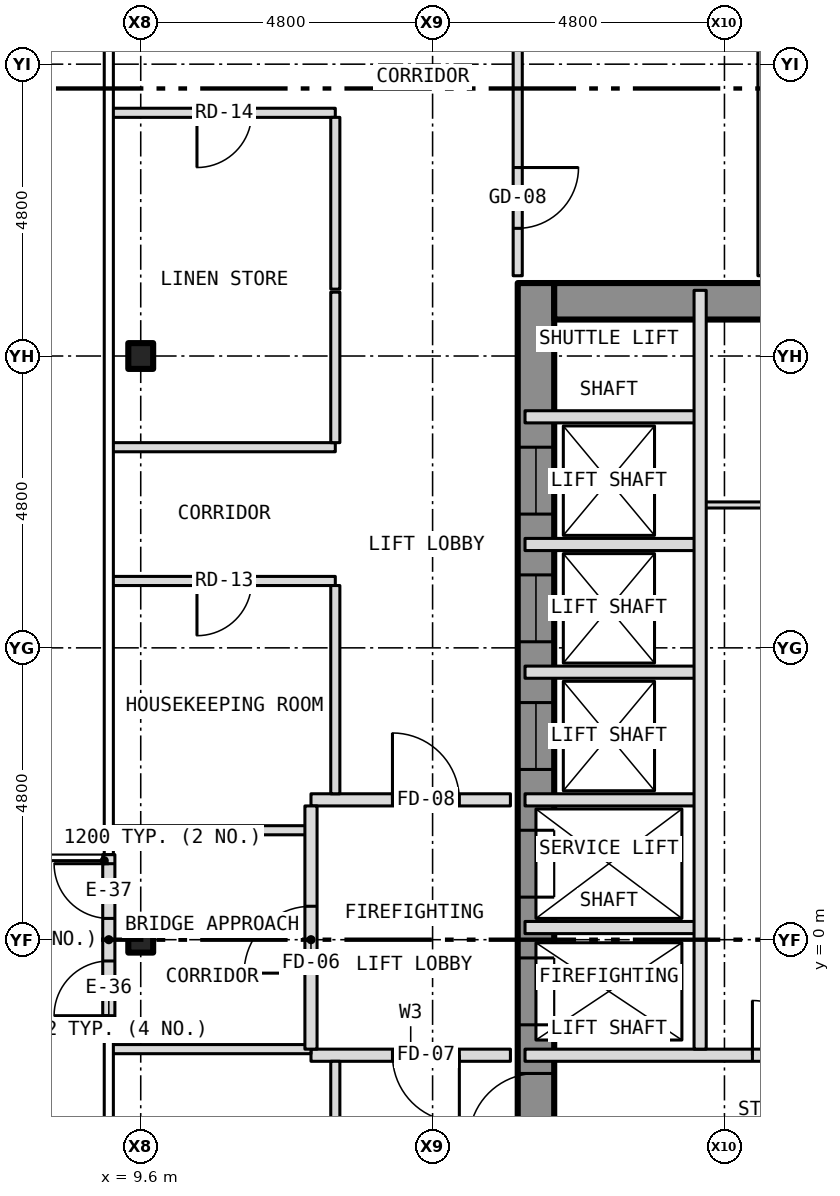
"""IFC4 building model, lengths in metres.
Left out: names, types, materials, properties, quantities, classifications, styles, units other than length and angle.
Written with IfcOpenShell. Run it as: python <this file> out.ifc"""

import sys

from ifc_helpers import new_model, si_unit, direction, frame, frame_2d, origin, origin_2d, place, context, subcontext, project, spatial, rectangle, i_section, extrude, element, fill, save


model = new_model("IFC4")
c1 = context("Model", 3, precision=1e-05, world=origin(), true_north=direction((0.0, 1.0)))
c2 = subcontext(c1, "Body", "Model", "MODEL_VIEW")
j1 = project(units=[si_unit("LENGTHUNIT", "METRE"), si_unit("PLANEANGLEUNIT", "RADIAN")], contexts=[c1])
p1 = place(None, origin())
s1 = spatial("IfcSite", under=j1, at=p1, CompositionType="ELEMENT")
p2 = place(p1, origin())
s2 = spatial("IfcBuilding", under=s1, at=p2, CompositionType="ELEMENT")
p3 = place(p2, frame((0.0, 0.0, 77.5)))
s3 = spatial("IfcBuildingStorey", under=s2, at=p3, CompositionType="ELEMENT", Elevation=77.5)
for number, where, z_axis, x_axis in (
    (1, (9.6, 0.0, -0.15), (0.0, 0.0, 1.0), (1.0, 0.0, 0.0)),
    (2, (9.6, 9.6, -0.15), (0.0, 0.0, 1.0), (1.0, 0.0, 0.0)),
):
    element("IfcColumn", number, at=place(p3, frame(where, z_axis=z_axis, x_axis=x_axis)), inside=s3, PredefinedType="COLUMN", context=c2, shape_type="SweptSolid", body=[
        extrude(i_section(OverallWidth=0.409, OverallDepth=0.424, WebThickness=0.033, FlangeThickness=0.052, at=origin_2d()), origin(), (0.0, 0.0, 1.0), 3.5),
    ])
p4 = place(p3, frame((16.1, -10.8, 0.0), z_axis=(0.0, 0.0, 1.0), x_axis=(0.0, 1.0, 0.0)))
e3 = element("IfcWall", 3, at=p4, inside=s3, PredefinedType="SHEAR", context=c2, shape_type="SweptSolid", body=[
    extrude(rectangle(XDim=21.6, YDim=0.6, at=frame_2d((10.8, 0.0))), origin(), (0.0, 0.0, 1.0), 3.25),
])
p5 = place(p4, frame((9.4, 0.0, 0.0)))
e4 = element("IfcOpeningElement", 4, at=p5, cuts=e3, PredefinedType="OPENING", context=c2, shape_type="SweptSolid", body=[
    extrude(rectangle(XDim=1.1, YDim=2.1, at=frame_2d((0.55, 1.05))), frame((0.0, 0.312, 0.0), z_axis=(0.0, -1.0, 0.0), x_axis=(1.0, 0.0, 0.0)), (0.0, 0.0, 1.0), 0.624),
])
p6 = place(p4, frame((11.5, 0.0, 0.0)))
e5 = element("IfcOpeningElement", 5, at=p6, cuts=e3, PredefinedType="OPENING", context=c2, shape_type="SweptSolid", body=[
    extrude(rectangle(XDim=1.1, YDim=2.1, at=frame_2d((0.55, 1.05))), frame((0.0, 0.312, 0.0), z_axis=(0.0, -1.0, 0.0), x_axis=(1.0, 0.0, 0.0)), (0.0, 0.0, 1.0), 0.624),
])
p7 = place(p4, frame((13.6, 0.0, 0.0)))
e6 = element("IfcOpeningElement", 6, at=p7, cuts=e3, PredefinedType="OPENING", context=c2, shape_type="SweptSolid", body=[
    extrude(rectangle(XDim=1.1, YDim=2.1, at=frame_2d((0.55, 1.05))), frame((0.0, 0.312, 0.0), z_axis=(0.0, -1.0, 0.0), x_axis=(1.0, 0.0, 0.0)), (0.0, 0.0, 1.0), 0.624),
])
p8 = place(p4, frame((15.7, 0.0, 0.0)))
e7 = element("IfcOpeningElement", 7, at=p8, cuts=e3, PredefinedType="OPENING", context=c2, shape_type="SweptSolid", body=[
    extrude(rectangle(XDim=1.1, YDim=2.1, at=frame_2d((0.55, 1.05))), frame((0.0, 0.312, 0.0), z_axis=(0.0, -1.0, 0.0), x_axis=(1.0, 0.0, 0.0)), (0.0, 0.0, 1.0), 0.624),
])
p9 = place(p4, frame((17.8, 0.0, 0.0)))
e8 = element("IfcOpeningElement", 8, at=p9, cuts=e3, PredefinedType="OPENING", context=c2, shape_type="SweptSolid", body=[
    extrude(rectangle(XDim=1.1, YDim=2.1, at=frame_2d((0.55, 1.05))), frame((0.0, 0.312, 0.0), z_axis=(0.0, -1.0, 0.0), x_axis=(1.0, 0.0, 0.0)), (0.0, 0.0, 1.0), 0.624),
])
p10 = place(p4, frame((5.642, 0.0, 0.0)))
e9 = element("IfcOpeningElement", 9, at=p10, cuts=e3, PredefinedType="OPENING", context=c2, shape_type="SweptSolid", body=[
    extrude(rectangle(XDim=1.1, YDim=2.1, at=frame_2d((0.55, 1.05))), frame((0.0, 0.312, 0.0), z_axis=(0.0, -1.0, 0.0), x_axis=(1.0, 0.0, 0.0)), (0.0, 0.0, 1.0), 0.624),
])
p11 = place(p4, frame((7.5, 0.0, 0.0)))
e10 = element("IfcOpeningElement", 10, at=p11, cuts=e3, PredefinedType="OPENING", context=c2, shape_type="SweptSolid", body=[
    extrude(rectangle(XDim=1.1, YDim=2.1, at=frame_2d((0.55, 1.05))), frame((0.0, 0.312, 0.0), z_axis=(0.0, -1.0, 0.0), x_axis=(1.0, 0.0, 0.0)), (0.0, 0.0, 1.0), 0.624),
])
p12 = place(p3, frame((16.4, 10.5, 0.0), z_axis=(0.0, 0.0, 1.0), x_axis=(1.0, 0.0, 0.0)))
e11 = element("IfcWall", 11, at=p12, inside=s3, PredefinedType="SHEAR", context=c2, shape_type="SweptSolid", body=[
    extrude(rectangle(XDim=7.0, YDim=0.6, at=frame_2d((3.5, 0.0))), origin(), (0.0, 0.0, 1.0), 3.25),
])
p13 = place(p3, frame((9.075, -1.4, 0.0), z_axis=(0.0, 0.0, 1.0), x_axis=(0.0, 1.0, 0.0)))
e12 = element("IfcWall", 12, at=p13, inside=s3, PredefinedType="SOLIDWALL", context=c2, shape_type="SweptSolid", body=[
    extrude(rectangle(XDim=2.8, YDim=0.2, at=frame_2d((1.4, 0.0))), origin(), (0.0, 0.0, 1.0), 3.5),
])
p14 = place(p13, frame((0.15, 0.0, 0.0)))
e13 = element("IfcOpeningElement", 13, at=p14, cuts=e12, PredefinedType="OPENING", context=c2, shape_type="SweptSolid", body=[
    extrude(rectangle(XDim=0.9, YDim=2.1, at=frame_2d((0.45, 1.05))), frame((0.0, 0.112, 0.0), z_axis=(0.0, -1.0, 0.0), x_axis=(1.0, 0.0, 0.0)), (0.0, 0.0, 1.0), 0.224),
])
p15 = place(p13, frame((1.75, 0.0, 0.0)))
e14 = element("IfcOpeningElement", 14, at=p15, cuts=e12, PredefinedType="OPENING", context=c2, shape_type="SweptSolid", body=[
    extrude(rectangle(XDim=0.9, YDim=2.1, at=frame_2d((0.45, 1.05))), frame((0.0, 0.112, 0.0), z_axis=(0.0, -1.0, 0.0), x_axis=(1.0, 0.0, 0.0)), (0.0, 0.0, 1.0), 0.224),
])
p16 = place(p3, frame((12.4, -1.9, 0.0), z_axis=(0.0, 0.0, 1.0), x_axis=(1.0, 0.0, 0.0)))
e15 = element("IfcWall", 15, at=p16, inside=s3, PredefinedType="PARTITIONING", context=c2, shape_type="SweptSolid", body=[
    extrude(rectangle(XDim=3.28, YDim=0.2, at=frame_2d((1.64, 0.0))), origin(), (0.0, 0.0, 1.0), 3.35),
])
p17 = place(p16, frame((1.34, 0.0, 0.0)))
e16 = element("IfcOpeningElement", 16, at=p17, cuts=e15, PredefinedType="OPENING", context=c2, shape_type="SweptSolid", body=[
    extrude(rectangle(XDim=1.1, YDim=2.1, at=frame_2d((0.55, 1.05))), frame((0.0, 0.112, 0.0), z_axis=(0.0, -1.0, 0.0), x_axis=(1.0, 0.0, 0.0)), (0.0, 0.0, 1.0), 0.224),
])
p18 = place(p3, frame((15.92, -1.9, 0.0), z_axis=(0.0, 0.0, 1.0), x_axis=(1.0, 0.0, 0.0)))
e17 = element("IfcWall", 17, at=p18, inside=s3, PredefinedType="PARTITIONING", context=c2, shape_type="SweptSolid", body=[
    extrude(rectangle(XDim=7.96, YDim=0.2, at=frame_2d((3.98, 0.0))), origin(), (0.0, 0.0, 1.0), 3.25),
])
p19 = place(p18, frame((3.74, 0.0, 0.0)))
e18 = element("IfcOpeningElement", 18, at=p19, cuts=e17, PredefinedType="OPENING", context=c2, shape_type="SweptSolid", body=[
    extrude(rectangle(XDim=0.9, YDim=2.1, at=frame_2d((0.45, 1.05))), frame((0.0, 0.112, 0.0), z_axis=(0.0, -1.0, 0.0), x_axis=(1.0, 0.0, 0.0)), (0.0, 0.0, 1.0), 0.224),
])
p20 = place(p3, frame((9.12, -1.8, 0.0), z_axis=(0.0, 0.0, 1.0), x_axis=(1.0, 0.0, 0.0)))
e19 = element("IfcWall", 19, at=p20, inside=s3, PredefinedType="PARTITIONING", context=c2, shape_type="SweptSolid", body=[
    extrude(rectangle(XDim=3.28, YDim=0.15, at=frame_2d((1.64, 0.0))), origin(), (0.0, 0.0, 1.0), 3.35),
])
p21 = place(p3, frame((15.92, 0.2, 0.0), z_axis=(0.0, 0.0, 1.0), x_axis=(1.0, 0.0, 0.0)))
e20 = element("IfcWall", 20, at=p21, inside=s3, PredefinedType="PARTITIONING", context=c2, shape_type="SweptSolid", body=[
    extrude(rectangle(XDim=2.88, YDim=0.2, at=frame_2d((1.44, 0.0))), origin(), (0.0, 0.0, 1.0), 3.25),
])
p22 = place(p3, frame((9.12, 1.8, 0.0), z_axis=(0.0, 0.0, 1.0), x_axis=(1.0, 0.0, 0.0)))
e21 = element("IfcWall", 21, at=p22, inside=s3, PredefinedType="PARTITIONING", context=c2, shape_type="SweptSolid", body=[
    extrude(rectangle(XDim=3.28, YDim=0.15, at=frame_2d((1.64, 0.0))), origin(), (0.0, 0.0, 1.0), 3.35),
])
p23 = place(p3, frame((12.4, 2.3, 0.0), z_axis=(0.0, 0.0, 1.0), x_axis=(1.0, 0.0, 0.0)))
e22 = element("IfcWall", 22, at=p23, inside=s3, PredefinedType="PARTITIONING", context=c2, shape_type="SweptSolid", body=[
    extrude(rectangle(XDim=3.28, YDim=0.2, at=frame_2d((1.64, 0.0))), origin(), (0.0, 0.0, 1.0), 3.35),
])
p24 = place(p23, frame((1.34, 0.0, 0.0)))
e23 = element("IfcOpeningElement", 23, at=p24, cuts=e22, PredefinedType="OPENING", context=c2, shape_type="SweptSolid", body=[
    extrude(rectangle(XDim=1.1, YDim=2.1, at=frame_2d((0.55, 1.05))), frame((0.0, 0.112, 0.0), z_axis=(0.0, -1.0, 0.0), x_axis=(1.0, 0.0, 0.0)), (0.0, 0.0, 1.0), 0.224),
])
for number, where, z_axis, x_axis in (
    (24, (15.92, 2.3, 0.0), (0.0, 0.0, 1.0), (1.0, 0.0, 0.0)),
    (25, (15.92, 4.4, 0.0), (0.0, 0.0, 1.0), (1.0, 0.0, 0.0)),
):
    element("IfcWall", number, at=place(p3, frame(where, z_axis=z_axis, x_axis=x_axis)), inside=s3, PredefinedType="PARTITIONING", context=c2, shape_type="SweptSolid", body=[
        extrude(rectangle(XDim=2.88, YDim=0.2, at=frame_2d((1.44, 0.0))), origin(), (0.0, 0.0, 1.0), 3.25),
    ])
p25 = place(p3, frame((9.12, 5.9, 0.0), z_axis=(0.0, 0.0, 1.0), x_axis=(1.0, 0.0, 0.0)))
e26 = element("IfcWall", 26, at=p25, inside=s3, PredefinedType="PARTITIONING", context=c2, shape_type="SweptSolid", body=[
    extrude(rectangle(XDim=3.68, YDim=0.15, at=frame_2d((1.84, 0.0))), origin(), (0.0, 0.0, 1.0), 3.35),
])
p26 = place(p25, frame((1.405, 0.0, 0.0)))
e27 = element("IfcOpeningElement", 27, at=p26, cuts=e26, PredefinedType="OPENING", context=c2, shape_type="SweptSolid", body=[
    extrude(rectangle(XDim=0.9, YDim=2.1, at=frame_2d((0.45, 1.05))), frame((0.0, 0.087, 0.0), z_axis=(0.0, -1.0, 0.0), x_axis=(1.0, 0.0, 0.0)), (0.0, 0.0, 1.0), 0.174),
])
p27 = place(p3, frame((15.92, 6.5, 0.0), z_axis=(0.0, 0.0, 1.0), x_axis=(1.0, 0.0, 0.0)))
e28 = element("IfcWall", 28, at=p27, inside=s3, PredefinedType="PARTITIONING", context=c2, shape_type="SweptSolid", body=[
    extrude(rectangle(XDim=2.88, YDim=0.2, at=frame_2d((1.44, 0.0))), origin(), (0.0, 0.0, 1.0), 3.25),
])
p28 = place(p3, frame((18.8, 7.15, 0.0), z_axis=(0.0, 0.0, 1.0), x_axis=(1.0, 0.0, 0.0)))
e29 = element("IfcWall", 29, at=p28, inside=s3, PredefinedType="PARTITIONING", context=c2, shape_type="SweptSolid", body=[
    extrude(rectangle(XDim=5.08, YDim=0.1, at=frame_2d((2.54, 0.0))), origin(), (0.0, 0.0, 1.0), 3.25),
])
p29 = place(p28, frame((2.15, 0.0, 0.0)))
e30 = element("IfcOpeningElement", 30, at=p29, cuts=e29, PredefinedType="OPENING", context=c2, shape_type="SweptSolid", body=[
    extrude(rectangle(XDim=0.9, YDim=2.1, at=frame_2d((0.45, 1.05))), frame((0.0, 0.062, 0.0), z_axis=(0.0, -1.0, 0.0), x_axis=(1.0, 0.0, 0.0)), (0.0, 0.0, 1.0), 0.124),
])
p30 = place(p3, frame((9.12, 8.1, 0.0), z_axis=(0.0, 0.0, 1.0), x_axis=(1.0, 0.0, 0.0)))
e31 = element("IfcWall", 31, at=p30, inside=s3, PredefinedType="PARTITIONING", context=c2, shape_type="SweptSolid", body=[
    extrude(rectangle(XDim=3.68, YDim=0.15, at=frame_2d((1.84, 0.0))), origin(), (0.0, 0.0, 1.0), 3.35),
])
p31 = place(p3, frame((15.92, 8.6, 0.0), z_axis=(0.0, 0.0, 1.0), x_axis=(1.0, 0.0, 0.0)))
e32 = element("IfcWall", 32, at=p31, inside=s3, PredefinedType="PARTITIONING", context=c2, shape_type="SweptSolid", body=[
    extrude(rectangle(XDim=2.88, YDim=0.2, at=frame_2d((1.44, 0.0))), origin(), (0.0, 0.0, 1.0), 3.25),
])
p32 = place(p3, frame((9.12, 13.6, 0.0), z_axis=(0.0, 0.0, 1.0), x_axis=(1.0, 0.0, 0.0)))
e33 = element("IfcWall", 33, at=p32, inside=s3, PredefinedType="PARTITIONING", context=c2, shape_type="SweptSolid", body=[
    extrude(rectangle(XDim=3.68, YDim=0.15, at=frame_2d((1.84, 0.0))), origin(), (0.0, 0.0, 1.0), 3.35),
])
p33 = place(p32, frame((1.405, 0.0, 0.0)))
e34 = element("IfcOpeningElement", 34, at=p33, cuts=e33, PredefinedType="OPENING", context=c2, shape_type="SweptSolid", body=[
    extrude(rectangle(XDim=0.9, YDim=2.1, at=frame_2d((0.45, 1.05))), frame((0.0, 0.087, 0.0), z_axis=(0.0, -1.0, 0.0), x_axis=(1.0, 0.0, 0.0)), (0.0, 0.0, 1.0), 0.174),
])
p34 = place(p3, frame((12.4, -1.8, 0.0), z_axis=(0.0, 0.0, 1.0), x_axis=(0.0, 1.0, 0.0)))
e35 = element("IfcWall", 35, at=p34, inside=s3, PredefinedType="PARTITIONING", context=c2, shape_type="SweptSolid", body=[
    extrude(rectangle(XDim=4.0, YDim=0.2, at=frame_2d((2.0, 0.0))), origin(), (0.0, 0.0, 1.0), 3.35),
])
p35 = place(p34, frame((1.25, 0.0, 0.0)))
e36 = element("IfcOpeningElement", 36, at=p35, cuts=e35, PredefinedType="OPENING", context=c2, shape_type="SweptSolid", body=[
    extrude(rectangle(XDim=1.1, YDim=2.1, at=frame_2d((0.55, 1.05))), frame((0.0, 0.112, 0.0), z_axis=(0.0, -1.0, 0.0), x_axis=(1.0, 0.0, 0.0)), (0.0, 0.0, 1.0), 0.224),
])
p36 = place(p3, frame((12.8, -13.525, 0.0), z_axis=(0.0, 0.0, 1.0), x_axis=(0.0, 1.0, 0.0)))
e37 = element("IfcWall", 37, at=p36, inside=s3, PredefinedType="PARTITIONING", context=c2, shape_type="SweptSolid", body=[
    extrude(rectangle(XDim=11.525, YDim=0.15, at=frame_2d((5.762, 0.0))), origin(), (0.0, 0.0, 1.0), 3.35),
])
p37 = place(p36, frame((6.725, 0.0, 0.0)))
e38 = element("IfcOpeningElement", 38, at=p37, cuts=e37, PredefinedType="OPENING", context=c2, shape_type="SweptSolid", body=[
    extrude(rectangle(XDim=0.9, YDim=2.1, at=frame_2d((0.45, 1.05))), frame((0.0, 0.087, 0.0), z_axis=(0.0, -1.0, 0.0), x_axis=(1.0, 0.0, 0.0)), (0.0, 0.0, 1.0), 0.174),
])
p38 = place(p3, frame((12.8, 2.4, 0.0), z_axis=(0.0, 0.0, 1.0), x_axis=(0.0, 1.0, 0.0)))
e39 = element("IfcWall", 39, at=p38, inside=s3, PredefinedType="PARTITIONING", context=c2, shape_type="SweptSolid", body=[
    extrude(rectangle(XDim=3.425, YDim=0.15, at=frame_2d((1.712, 0.0))), origin(), (0.0, 0.0, 1.0), 3.35),
])
p39 = place(p3, frame((12.8, 8.175, 0.0), z_axis=(0.0, 0.0, 1.0), x_axis=(0.0, 1.0, 0.0)))
e40 = element("IfcWall", 40, at=p39, inside=s3, PredefinedType="PARTITIONING", context=c2, shape_type="SweptSolid", body=[
    extrude(rectangle(XDim=2.475, YDim=0.15, at=frame_2d((1.237, 0.0))), origin(), (0.0, 0.0, 1.0), 3.35),
])
p40 = place(p3, frame((12.8, 10.7, 0.0), z_axis=(0.0, 0.0, 1.0), x_axis=(0.0, 1.0, 0.0)))
e41 = element("IfcWall", 41, at=p40, inside=s3, PredefinedType="PARTITIONING", context=c2, shape_type="SweptSolid", body=[
    extrude(rectangle(XDim=2.825, YDim=0.15, at=frame_2d((1.413, 0.0))), origin(), (0.0, 0.0, 1.0), 3.35),
])
p41 = place(p3, frame((15.8, 10.92, 0.0), z_axis=(0.0, 0.0, 1.0), x_axis=(0.0, 1.0, 0.0)))
e42 = element("IfcWall", 42, at=p41, inside=s3, PredefinedType="PARTITIONING", context=c2, shape_type="SweptSolid", body=[
    extrude(rectangle(XDim=4.805, YDim=0.15, at=frame_2d((2.403, 0.0))), origin(), (0.0, 0.0, 1.0), 3.35),
])
p42 = place(p41, frame((0.78, 0.0, 0.0)))
e43 = element("IfcOpeningElement", 43, at=p42, cuts=e42, PredefinedType="OPENING", context=c2, shape_type="SweptSolid", body=[
    extrude(rectangle(XDim=1.0, YDim=2.1, at=frame_2d((0.5, 1.05))), frame((0.0, 0.087, 0.0), z_axis=(0.0, -1.0, 0.0), x_axis=(1.0, 0.0, 0.0)), (0.0, 0.0, 1.0), 0.174),
])
p43 = place(p3, frame((18.8, -1.8, 0.0), z_axis=(0.0, 0.0, 1.0), x_axis=(0.0, 1.0, 0.0)))
e44 = element("IfcWall", 44, at=p43, inside=s3, PredefinedType="PARTITIONING", context=c2, shape_type="SweptSolid", body=[
    extrude(rectangle(XDim=12.48, YDim=0.2, at=frame_2d((6.24, 0.0))), origin(), (0.0, 0.0, 1.0), 3.25),
])
p44 = place(p3, frame((19.8, 10.92, 0.0), z_axis=(0.0, 0.0, 1.0), x_axis=(0.0, 1.0, 0.0)))
e45 = element("IfcWall", 45, at=p44, inside=s3, PredefinedType="PARTITIONING", context=c2, shape_type="SweptSolid", body=[
    extrude(rectangle(XDim=12.96, YDim=0.1, at=frame_2d((6.48, 0.0))), origin(), (0.0, 0.0, 1.0), 3.35),
])
p45 = place(p44, frame((6.03, 0.0, 0.0)))
e46 = element("IfcOpeningElement", 46, at=p45, cuts=e45, PredefinedType="OPENING", context=c2, shape_type="SweptSolid", body=[
    extrude(rectangle(XDim=0.9, YDim=2.1, at=frame_2d((0.45, 1.05))), frame((0.0, 0.062, 0.0), z_axis=(0.0, -1.0, 0.0), x_axis=(1.0, 0.0, 0.0)), (0.0, 0.0, 1.0), 0.124),
])
p46 = place(p14, origin())
e47 = element("IfcDoor", 47, at=p46, inside=s3, OperationType="SINGLE_SWING_LEFT", PredefinedType="DOOR", context=c2, shape_type="SweptSolid", body=[
    extrude(rectangle(XDim=0.9, YDim=2.1, at=frame_2d((0.45, 1.05))), frame((0.0, 0.025, 0.0), z_axis=(0.0, -1.0, 0.0), x_axis=(1.0, 0.0, 0.0)), (0.0, 0.0, 1.0), 0.05),
])
fill(e13, e47)
p47 = place(p15, origin())
e48 = element("IfcDoor", 48, at=p47, inside=s3, OperationType="SINGLE_SWING_RIGHT", PredefinedType="DOOR", context=c2, shape_type="SweptSolid", body=[
    extrude(rectangle(XDim=0.9, YDim=2.1, at=frame_2d((0.45, 1.05))), frame((0.0, 0.025, 0.0), z_axis=(0.0, -1.0, 0.0), x_axis=(1.0, 0.0, 0.0)), (0.0, 0.0, 1.0), 0.05),
])
fill(e14, e48)
p48 = place(p5, origin())
e49 = element("IfcDoor", 49, at=p48, inside=s3, OperationType="SLIDING_TO_LEFT", PredefinedType="DOOR", context=c2, shape_type="SweptSolid", body=[
    extrude(rectangle(XDim=1.1, YDim=2.1, at=frame_2d((0.55, 1.05))), frame((0.0, 0.025, 0.0), z_axis=(0.0, -1.0, 0.0), x_axis=(1.0, 0.0, 0.0)), (0.0, 0.0, 1.0), 0.05),
])
fill(e4, e49)
p49 = place(p6, origin())
e50 = element("IfcDoor", 50, at=p49, inside=s3, OperationType="SLIDING_TO_LEFT", PredefinedType="DOOR", context=c2, shape_type="SweptSolid", body=[
    extrude(rectangle(XDim=1.1, YDim=2.1, at=frame_2d((0.55, 1.05))), frame((0.0, 0.025, 0.0), z_axis=(0.0, -1.0, 0.0), x_axis=(1.0, 0.0, 0.0)), (0.0, 0.0, 1.0), 0.05),
])
fill(e5, e50)
p50 = place(p7, origin())
e51 = element("IfcDoor", 51, at=p50, inside=s3, OperationType="SLIDING_TO_LEFT", PredefinedType="DOOR", context=c2, shape_type="SweptSolid", body=[
    extrude(rectangle(XDim=1.1, YDim=2.1, at=frame_2d((0.55, 1.05))), frame((0.0, 0.025, 0.0), z_axis=(0.0, -1.0, 0.0), x_axis=(1.0, 0.0, 0.0)), (0.0, 0.0, 1.0), 0.05),
])
fill(e6, e51)
p51 = place(p8, origin())
e52 = element("IfcDoor", 52, at=p51, inside=s3, OperationType="SLIDING_TO_LEFT", PredefinedType="DOOR", context=c2, shape_type="SweptSolid", body=[
    extrude(rectangle(XDim=1.1, YDim=2.1, at=frame_2d((0.55, 1.05))), frame((0.0, 0.025, 0.0), z_axis=(0.0, -1.0, 0.0), x_axis=(1.0, 0.0, 0.0)), (0.0, 0.0, 1.0), 0.05),
])
fill(e7, e52)
p52 = place(p9, origin())
e53 = element("IfcDoor", 53, at=p52, inside=s3, OperationType="SLIDING_TO_LEFT", PredefinedType="DOOR", context=c2, shape_type="SweptSolid", body=[
    extrude(rectangle(XDim=1.1, YDim=2.1, at=frame_2d((0.55, 1.05))), frame((0.0, 0.025, 0.0), z_axis=(0.0, -1.0, 0.0), x_axis=(1.0, 0.0, 0.0)), (0.0, 0.0, 1.0), 0.05),
])
fill(e8, e53)
p53 = place(p11, origin())
e54 = element("IfcDoor", 54, at=p53, inside=s3, OperationType="SINGLE_SWING_LEFT", PredefinedType="DOOR", context=c2, shape_type="SweptSolid", body=[
    extrude(rectangle(XDim=1.1, YDim=2.1, at=frame_2d((0.55, 1.05))), frame((0.0, 0.025, 0.0), z_axis=(0.0, -1.0, 0.0), x_axis=(1.0, 0.0, 0.0)), (0.0, 0.0, 1.0), 0.05),
])
fill(e10, e54)
p54 = place(p19, origin())
e55 = element("IfcDoor", 55, at=p54, inside=s3, OperationType="SINGLE_SWING_LEFT", PredefinedType="DOOR", context=c2, shape_type="SweptSolid", body=[
    extrude(rectangle(XDim=0.9, YDim=2.1, at=frame_2d((0.45, 1.05))), frame((0.0, 0.025, 0.0), z_axis=(0.0, -1.0, 0.0), x_axis=(1.0, 0.0, 0.0)), (0.0, 0.0, 1.0), 0.05),
])
fill(e18, e55)
p55 = place(p35, origin())
e56 = element("IfcDoor", 56, at=p55, inside=s3, OperationType="SINGLE_SWING_LEFT", PredefinedType="DOOR", context=c2, shape_type="SweptSolid", body=[
    extrude(rectangle(XDim=1.1, YDim=2.1, at=frame_2d((0.55, 1.05))), frame((0.0, 0.025, 0.0), z_axis=(0.0, -1.0, 0.0), x_axis=(1.0, 0.0, 0.0)), (0.0, 0.0, 1.0), 0.05),
])
fill(e36, e56)
p56 = place(p17, origin())
e57 = element("IfcDoor", 57, at=p56, inside=s3, OperationType="SINGLE_SWING_RIGHT", PredefinedType="DOOR", context=c2, shape_type="SweptSolid", body=[
    extrude(rectangle(XDim=1.1, YDim=2.1, at=frame_2d((0.55, 1.05))), frame((0.0, 0.025, 0.0), z_axis=(0.0, -1.0, 0.0), x_axis=(1.0, 0.0, 0.0)), (0.0, 0.0, 1.0), 0.05),
])
fill(e16, e57)
p57 = place(p24, origin())
e58 = element("IfcDoor", 58, at=p57, inside=s3, OperationType="SINGLE_SWING_LEFT", PredefinedType="DOOR", context=c2, shape_type="SweptSolid", body=[
    extrude(rectangle(XDim=1.1, YDim=2.1, at=frame_2d((0.55, 1.05))), frame((0.0, 0.025, 0.0), z_axis=(0.0, -1.0, 0.0), x_axis=(1.0, 0.0, 0.0)), (0.0, 0.0, 1.0), 0.05),
])
fill(e23, e58)
p58 = place(p42, origin())
e59 = element("IfcDoor", 59, at=p58, inside=s3, OperationType="SINGLE_SWING_RIGHT", PredefinedType="DOOR", context=c2, shape_type="SweptSolid", body=[
    extrude(rectangle(XDim=1.0, YDim=2.1, at=frame_2d((0.5, 1.05))), frame((0.0, 0.025, 0.0), z_axis=(0.0, -1.0, 0.0), x_axis=(1.0, 0.0, 0.0)), (0.0, 0.0, 1.0), 0.05),
])
fill(e43, e59)
p59 = place(p26, origin())
e60 = element("IfcDoor", 60, at=p59, inside=s3, OperationType="SINGLE_SWING_LEFT", PredefinedType="DOOR", context=c2, shape_type="SweptSolid", body=[
    extrude(rectangle(XDim=0.9, YDim=2.1, at=frame_2d((0.45, 1.05))), frame((0.0, 0.025, 0.0), z_axis=(0.0, -1.0, 0.0), x_axis=(1.0, 0.0, 0.0)), (0.0, 0.0, 1.0), 0.05),
])
fill(e27, e60)
p60 = place(p33, origin())
e61 = element("IfcDoor", 61, at=p60, inside=s3, OperationType="SINGLE_SWING_LEFT", PredefinedType="DOOR", context=c2, shape_type="SweptSolid", body=[
    extrude(rectangle(XDim=0.9, YDim=2.1, at=frame_2d((0.45, 1.05))), frame((0.0, 0.025, 0.0), z_axis=(0.0, -1.0, 0.0), x_axis=(1.0, 0.0, 0.0)), (0.0, 0.0, 1.0), 0.05),
])
fill(e34, e61)
save(model, sys.argv[1])
